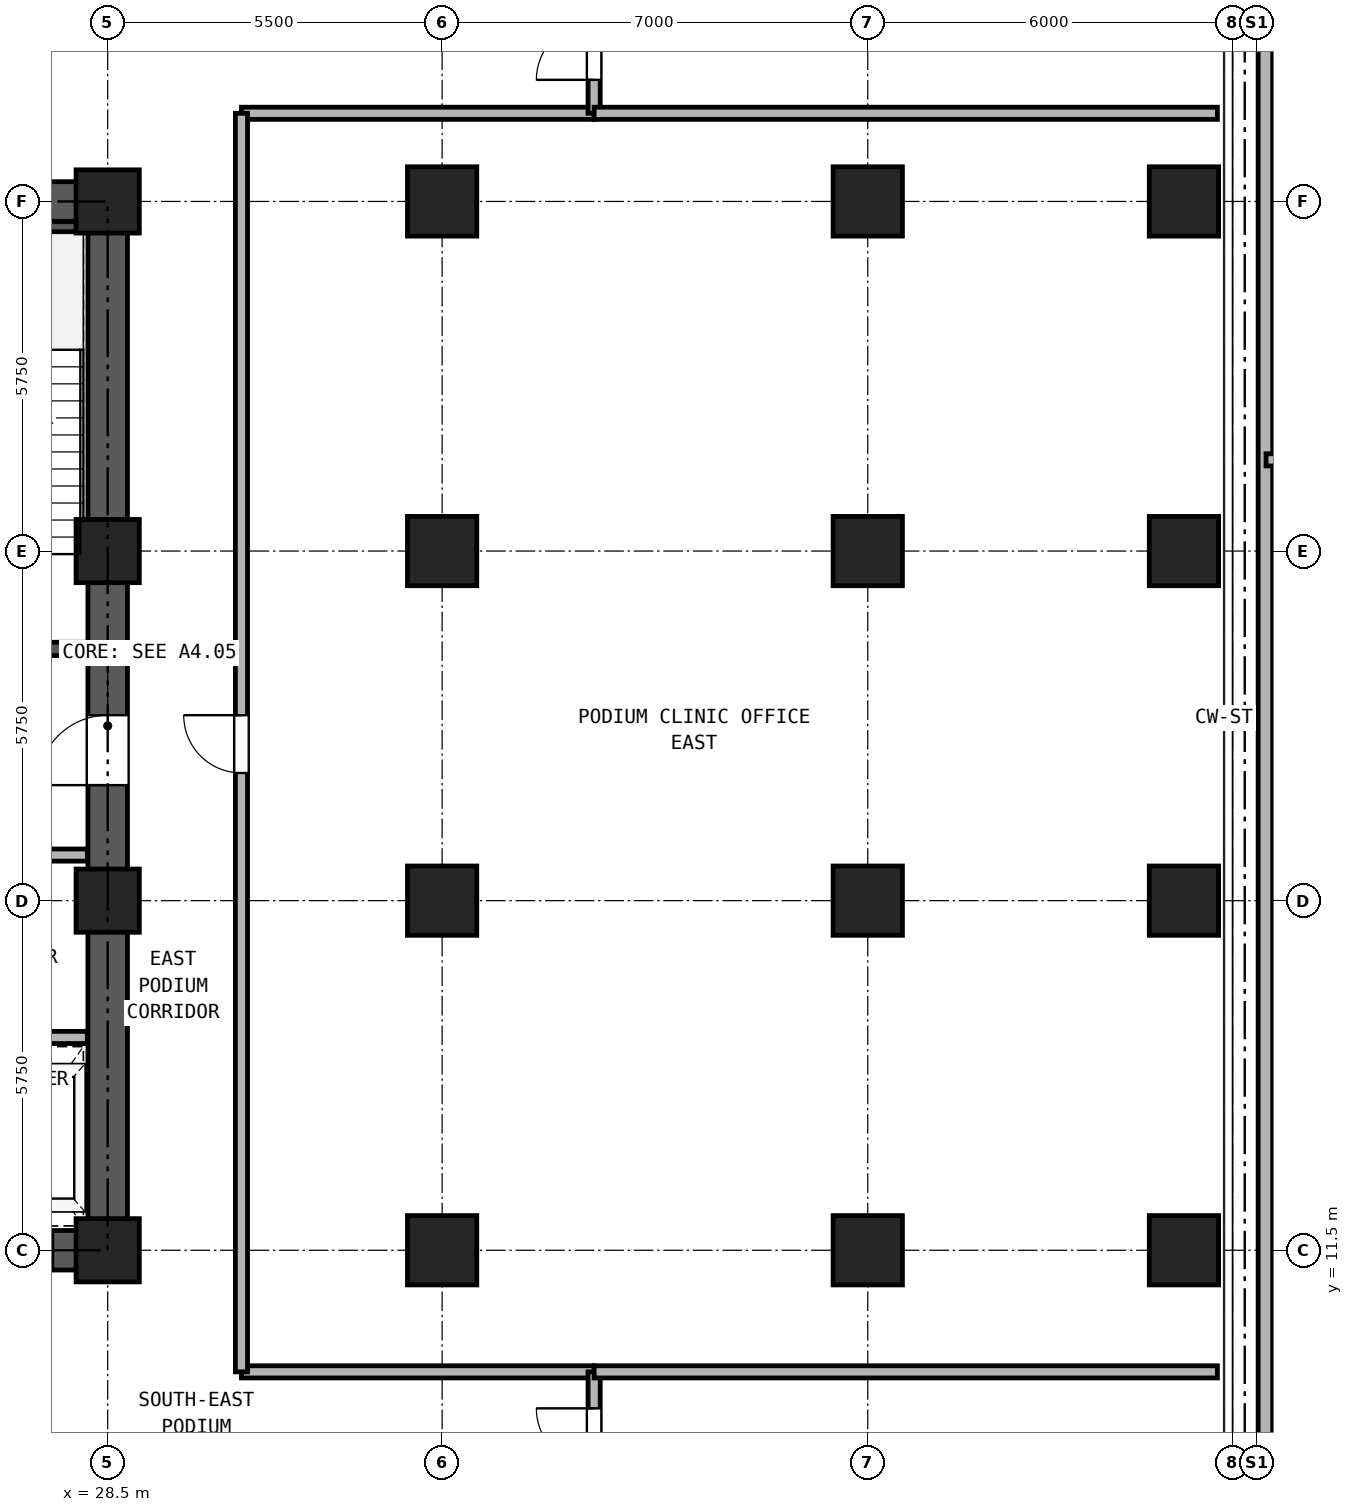
"""IFC4 building model, lengths in metres.
Left out: names, types, materials, properties, quantities, classifications, styles, units other than length and angle.
Written with IfcOpenShell. Run it as: python <this file> out.ifc"""

import sys

from ifc_helpers import new_model, si_unit, direction, frame, frame_2d, origin, origin_2d, place, context, subcontext, project, spatial, rectangle, hollow_rectangle, extrude, source, transform, mapped, element, fill, save


model = new_model("IFC4")
c1 = context("Model", 3, precision=1e-05, world=origin(), true_north=direction((0.0, 1.0)))
c2 = subcontext(c1, "Body", "Model", "MODEL_VIEW")
j1 = project(units=[si_unit("LENGTHUNIT", "METRE"), si_unit("PLANEANGLEUNIT", "RADIAN")], contexts=[c1])
p1 = place(None, origin())
s1 = spatial("IfcSite", under=j1, at=p1, CompositionType="ELEMENT")
p2 = place(p1, origin())
s2 = spatial("IfcBuilding", under=s1, at=p2, CompositionType="ELEMENT")
p3 = place(p2, frame((0.0, 0.0, 13.5)))
s3 = spatial("IfcBuildingStorey", under=s2, at=p3, CompositionType="ELEMENT", Elevation=13.5)
m1 = source(origin(), c2, "Body", "SweptSolid", [
    extrude(hollow_rectangle(XDim=1.14, YDim=1.14, WallThickness=0.07, at=origin_2d()), origin(), (0.0, 0.0, 1.0), 4.18),
])
for number, where, z_axis, x_axis in (
    (1, (46.2, 11.5, 0.0), (0.0, 0.0, 1.0), (1.0, 0.0, 0.0)),
    (2, (46.2, 17.25, 0.0), (0.0, 0.0, 1.0), (1.0, 0.0, 0.0)),
    (3, (46.2, 23.0, 0.0), (0.0, 0.0, 1.0), (1.0, 0.0, 0.0)),
    (4, (46.2, 28.75, 0.0), (0.0, 0.0, 1.0), (1.0, 0.0, 0.0)),
):
    element("IfcColumn", number, at=place(p3, frame(where, z_axis=z_axis, x_axis=x_axis)), inside=s3, PredefinedType="COLUMN", context=c2, shape_type="MappedRepresentation", body=[
        mapped(m1, transform((0.0, 0.0, 0.0), x_axis=(1.0, 0.0, 0.0), y_axis=(0.0, 1.0, 0.0), z_axis=(0.0, 0.0, 1.0), scale=1.0)),
    ])
m2 = source(origin(), c2, "Body", "SweptSolid", [
    extrude(hollow_rectangle(XDim=1.04, YDim=1.04, WallThickness=0.065, at=origin_2d()), origin(), (0.0, 0.0, 1.0), 4.18),
])
for number, where, z_axis, x_axis in (
    (5, (28.5, 11.5, 0.0), (0.0, 0.0, 1.0), (1.0, 0.0, 0.0)),
    (6, (28.5, 17.25, 0.0), (0.0, 0.0, 1.0), (1.0, 0.0, 0.0)),
    (7, (28.5, 23.0, 0.0), (0.0, 0.0, 1.0), (1.0, 0.0, 0.0)),
    (8, (28.5, 28.75, 0.0), (0.0, 0.0, 1.0), (1.0, 0.0, 0.0)),
):
    element("IfcColumn", number, at=place(p3, frame(where, z_axis=z_axis, x_axis=x_axis)), inside=s3, PredefinedType="COLUMN", context=c2, shape_type="MappedRepresentation", body=[
        mapped(m2, transform((0.0, 0.0, 0.0), x_axis=(1.0, 0.0, 0.0), y_axis=(0.0, 1.0, 0.0), z_axis=(0.0, 0.0, 1.0), scale=1.0)),
    ])
for number, where, z_axis, x_axis in (
    (9, (34.0, 11.5, 0.0), (0.0, 0.0, 1.0), (1.0, 0.0, 0.0)),
    (10, (34.0, 17.25, 0.0), (0.0, 0.0, 1.0), (1.0, 0.0, 0.0)),
    (11, (34.0, 23.0, 0.0), (0.0, 0.0, 1.0), (1.0, 0.0, 0.0)),
    (12, (34.0, 28.75, 0.0), (0.0, 0.0, 1.0), (1.0, 0.0, 0.0)),
    (13, (41.0, 11.5, 0.0), (0.0, 0.0, 1.0), (1.0, 0.0, 0.0)),
    (14, (41.0, 17.25, 0.0), (0.0, 0.0, 1.0), (1.0, 0.0, 0.0)),
    (15, (41.0, 23.0, 0.0), (0.0, 0.0, 1.0), (1.0, 0.0, 0.0)),
    (16, (41.0, 28.75, 0.0), (0.0, 0.0, 1.0), (1.0, 0.0, 0.0)),
):
    element("IfcColumn", number, at=place(p3, frame(where, z_axis=z_axis, x_axis=x_axis)), inside=s3, PredefinedType="COLUMN", context=c2, shape_type="MappedRepresentation", body=[
        mapped(m1, transform((0.0, 0.0, 0.0), x_axis=(1.0, 0.0, 0.0), y_axis=(0.0, 1.0, 0.0), z_axis=(0.0, 0.0, 1.0), scale=1.0)),
    ])
p4 = place(p3, frame((47.54, -0.54, 0.0), z_axis=(0.0, 0.0, 1.0), x_axis=(0.0, 1.0, 0.0)))
e17 = element("IfcWall", 17, at=p4, inside=s3, PredefinedType="SOLIDWALL", context=c2, shape_type="SweptSolid", body=[
    extrude(rectangle(XDim=40.89, YDim=0.24, at=frame_2d((20.445, 0.0))), origin(), (0.0, 0.0, 1.0), 4.18),
])
p5 = place(p3, frame((18.175, 11.5, 0.0), z_axis=(0.0, 0.0, 1.0), x_axis=(1.0, 0.0, 0.0)))
e18 = element("IfcWall", 18, at=p5, inside=s3, PredefinedType="SHEAR", context=c2, shape_type="SweptSolid", body=[
    extrude(rectangle(XDim=10.65, YDim=0.65, at=frame_2d((5.325, 0.0))), origin(), (0.0, 0.0, 1.0), 4.18),
])
p6 = place(p5, frame((1.195, 0.0, 0.0)))
e19 = element("IfcOpeningElement", 19, at=p6, cuts=e18, PredefinedType="OPENING", context=c2, shape_type="SweptSolid", body=[
    extrude(rectangle(XDim=1.1, YDim=2.25, at=frame_2d((0.55, 1.125))), frame((0.0, 0.335, 0.0), z_axis=(0.0, -1.0, 0.0), x_axis=(1.0, 0.0, 0.0)), (0.0, 0.0, 1.0), 0.67),
])
p7 = place(p5, frame((3.495, 0.0, 0.0)))
e20 = element("IfcOpeningElement", 20, at=p7, cuts=e18, PredefinedType="OPENING", context=c2, shape_type="SweptSolid", body=[
    extrude(rectangle(XDim=1.1, YDim=2.25, at=frame_2d((0.55, 1.125))), frame((0.0, 0.335, 0.0), z_axis=(0.0, -1.0, 0.0), x_axis=(1.0, 0.0, 0.0)), (0.0, 0.0, 1.0), 0.67),
])
p8 = place(p5, frame((5.925, 0.0, 0.0)))
e21 = element("IfcOpeningElement", 21, at=p8, cuts=e18, PredefinedType="OPENING", context=c2, shape_type="SweptSolid", body=[
    extrude(rectangle(XDim=1.1, YDim=2.25, at=frame_2d((0.55, 1.125))), frame((0.0, 0.335, 0.0), z_axis=(0.0, -1.0, 0.0), x_axis=(1.0, 0.0, 0.0)), (0.0, 0.0, 1.0), 0.67),
])
p9 = place(p5, frame((8.325, 0.0, 0.0)))
e22 = element("IfcOpeningElement", 22, at=p9, cuts=e18, PredefinedType="OPENING", context=c2, shape_type="SweptSolid", body=[
    extrude(rectangle(XDim=1.1, YDim=2.25, at=frame_2d((0.55, 1.125))), frame((0.0, 0.335, 0.0), z_axis=(0.0, -1.0, 0.0), x_axis=(1.0, 0.0, 0.0)), (0.0, 0.0, 1.0), 0.67),
])
p10 = place(p3, frame((18.175, 28.75, 0.0), z_axis=(0.0, 0.0, 1.0), x_axis=(1.0, 0.0, 0.0)))
e23 = element("IfcWall", 23, at=p10, inside=s3, PredefinedType="SHEAR", context=c2, shape_type="SweptSolid", body=[
    extrude(rectangle(XDim=10.65, YDim=0.65, at=frame_2d((5.325, 0.0))), origin(), (0.0, 0.0, 1.0), 4.18),
])
p11 = place(p10, frame((4.205, 0.0, 0.0)))
e24 = element("IfcOpeningElement", 24, at=p11, cuts=e23, PredefinedType="OPENING", context=c2, shape_type="SweptSolid", body=[
    extrude(rectangle(XDim=0.9, YDim=2.05, at=frame_2d((0.45, 1.025))), frame((0.0, 0.335, 0.0), z_axis=(0.0, -1.0, 0.0), x_axis=(1.0, 0.0, 0.0)), (0.0, 0.0, 1.0), 0.67),
])
p12 = place(p10, frame((5.745, 0.0, 0.0)))
e25 = element("IfcOpeningElement", 25, at=p12, cuts=e23, PredefinedType="OPENING", context=c2, shape_type="SweptSolid", body=[
    extrude(rectangle(XDim=0.9, YDim=2.05, at=frame_2d((0.45, 1.025))), frame((0.0, 0.335, 0.0), z_axis=(0.0, -1.0, 0.0), x_axis=(1.0, 0.0, 0.0)), (0.0, 0.0, 1.0), 0.67),
])
p13 = place(p3, frame((28.5, 11.825, 0.0), z_axis=(0.0, 0.0, 1.0), x_axis=(0.0, 1.0, 0.0)))
e26 = element("IfcWall", 26, at=p13, inside=s3, PredefinedType="SHEAR", context=c2, shape_type="SweptSolid", body=[
    extrude(rectangle(XDim=16.6, YDim=0.65, at=frame_2d((8.3, 0.0))), origin(), (0.0, 0.0, 1.0), 4.18),
])
p14 = place(p13, frame((7.325, 0.0, 0.0)))
e27 = element("IfcOpeningElement", 27, at=p14, cuts=e26, PredefinedType="OPENING", context=c2, shape_type="SweptSolid", body=[
    extrude(rectangle(XDim=1.15, YDim=2.2, at=frame_2d((0.575, 1.1))), frame((0.0, 0.335, 0.0), z_axis=(0.0, -1.0, 0.0), x_axis=(1.0, 0.0, 0.0)), (0.0, 0.0, 1.0), 0.67),
])
p15 = place(p3, frame((25.13, 28.335, 0.0), z_axis=(0.0, 0.0, 1.0), x_axis=(1.0, 0.0, 0.0)))
e28 = element("IfcWall", 28, at=p15, inside=s3, PredefinedType="PARTITIONING", context=c2, shape_type="SweptSolid", body=[
    extrude(rectangle(XDim=3.035, YDim=0.165, at=frame_2d((1.518, 0.0))), origin(), (0.0, 0.0, 1.0), 4.18),
])
p16 = place(p3, frame((25.13, 21.39, 0.0), z_axis=(0.0, 0.0, 1.0), x_axis=(1.0, 0.0, 0.0)))
e29 = element("IfcWall", 29, at=p16, inside=s3, PredefinedType="SOLIDWALL", context=c2, shape_type="SweptSolid", body=[
    extrude(rectangle(XDim=3.035, YDim=0.22, at=frame_2d((1.518, 0.0))), origin(), (0.0, 0.0, 1.0), 4.18),
])
p17 = place(p16, frame((0.92, 0.0, 0.0)))
e30 = element("IfcOpeningElement", 30, at=p17, cuts=e29, PredefinedType="OPENING", context=c2, shape_type="SweptSolid", body=[
    extrude(rectangle(XDim=1.15, YDim=2.2, at=frame_2d((0.575, 1.1))), frame((0.0, 0.12, 0.0), z_axis=(0.0, -1.0, 0.0), x_axis=(1.0, 0.0, 0.0)), (0.0, 0.0, 1.0), 0.24),
])
p18 = place(p3, frame((18.835, 18.0, 0.0), z_axis=(0.0, 0.0, 1.0), x_axis=(1.0, 0.0, 0.0)))
e31 = element("IfcWall", 31, at=p18, inside=s3, PredefinedType="PARTITIONING", context=c2, shape_type="SweptSolid", body=[
    extrude(rectangle(XDim=9.33, YDim=0.2, at=frame_2d((4.665, 0.0))), origin(), (0.0, 0.0, 1.0), 4.18),
])
p19 = place(p18, frame((0.415, 0.0, 0.0)))
e32 = element("IfcOpeningElement", 32, at=p19, cuts=e31, PredefinedType="OPENING", context=c2, shape_type="SweptSolid", body=[
    extrude(rectangle(XDim=1.3, YDim=2.3, at=frame_2d((0.65, 1.15))), frame((0.0, 0.11, 0.0), z_axis=(0.0, -1.0, 0.0), x_axis=(1.0, 0.0, 0.0)), (0.0, 0.0, 1.0), 0.22),
])
p20 = place(p18, frame((2.515, 0.0, 0.0)))
e33 = element("IfcOpeningElement", 33, at=p20, cuts=e31, PredefinedType="OPENING", context=c2, shape_type="SweptSolid", body=[
    extrude(rectangle(XDim=1.3, YDim=2.3, at=frame_2d((0.65, 1.15))), frame((0.0, 0.11, 0.0), z_axis=(0.0, -1.0, 0.0), x_axis=(1.0, 0.0, 0.0)), (0.0, 0.0, 1.0), 0.22),
])
p21 = place(p18, frame((4.915, 0.0, 0.0)))
e34 = element("IfcOpeningElement", 34, at=p21, cuts=e31, PredefinedType="OPENING", context=c2, shape_type="SweptSolid", body=[
    extrude(rectangle(XDim=0.9, YDim=2.05, at=frame_2d((0.45, 1.025))), frame((0.0, 0.11, 0.0), z_axis=(0.0, -1.0, 0.0), x_axis=(1.0, 0.0, 0.0)), (0.0, 0.0, 1.0), 0.22),
])
p22 = place(p18, frame((7.615, 0.0, 0.0)))
e35 = element("IfcOpeningElement", 35, at=p22, cuts=e31, PredefinedType="OPENING", context=c2, shape_type="SweptSolid", body=[
    extrude(rectangle(XDim=0.9, YDim=2.05, at=frame_2d((0.45, 1.025))), frame((0.0, 0.11, 0.0), z_axis=(0.0, -1.0, 0.0), x_axis=(1.0, 0.0, 0.0)), (0.0, 0.0, 1.0), 0.22),
])
p23 = place(p3, frame((18.835, 15.0, 0.0), z_axis=(0.0, 0.0, 1.0), x_axis=(1.0, 0.0, 0.0)))
e36 = element("IfcWall", 36, at=p23, inside=s3, PredefinedType="PARTITIONING", context=c2, shape_type="SweptSolid", body=[
    extrude(rectangle(XDim=9.33, YDim=0.2, at=frame_2d((4.665, 0.0))), origin(), (0.0, 0.0, 1.0), 4.18),
])
for number, where, z_axis, x_axis in (
    (37, (30.7, 9.5, 0.0), (0.0, 0.0, 1.0), (1.0, 0.0, 0.0)),
    (38, (30.7, 30.2, 0.0), (0.0, 0.0, 1.0), (1.0, 0.0, 0.0)),
):
    element("IfcWall", number, at=place(p3, frame(where, z_axis=z_axis, x_axis=x_axis)), inside=s3, PredefinedType="PARTITIONING", context=c2, shape_type="SweptSolid", body=[
        extrude(rectangle(XDim=5.8, YDim=0.2, at=frame_2d((2.9, 0.0))), origin(), (0.0, 0.0, 1.0), 4.18),
    ])
p24 = place(p3, frame((30.7, 9.5, 0.0), z_axis=(0.0, 0.0, 1.0), x_axis=(0.0, 1.0, 0.0)))
e39 = element("IfcWall", 39, at=p24, inside=s3, PredefinedType="PARTITIONING", context=c2, shape_type="SweptSolid", body=[
    extrude(rectangle(XDim=20.7, YDim=0.2, at=frame_2d((10.35, 0.0))), origin(), (0.0, 0.0, 1.0), 4.18),
])
p25 = place(p24, frame((9.85, 0.0, 0.0)))
e40 = element("IfcOpeningElement", 40, at=p25, cuts=e39, PredefinedType="OPENING", context=c2, shape_type="SweptSolid", body=[
    extrude(rectangle(XDim=0.95, YDim=2.15, at=frame_2d((0.475, 1.075))), frame((0.0, 0.11, 0.0), z_axis=(0.0, -1.0, 0.0), x_axis=(1.0, 0.0, 0.0)), (0.0, 0.0, 1.0), 0.22),
])
p26 = place(p3, frame((36.5, 0.25, 0.0), z_axis=(0.0, 0.0, 1.0), x_axis=(0.0, 1.0, 0.0)))
e41 = element("IfcWall", 41, at=p26, inside=s3, PredefinedType="PARTITIONING", context=c2, shape_type="SweptSolid", body=[
    extrude(rectangle(XDim=9.25, YDim=0.2, at=frame_2d((4.625, 0.0))), origin(), (0.0, 0.0, 1.0), 4.18),
])
p27 = place(p26, frame((7.7, 0.0, 0.0)))
e42 = element("IfcOpeningElement", 42, at=p27, cuts=e41, PredefinedType="OPENING", context=c2, shape_type="SweptSolid", body=[
    extrude(rectangle(XDim=0.95, YDim=2.15, at=frame_2d((0.475, 1.075))), frame((0.0, 0.11, 0.0), z_axis=(0.0, -1.0, 0.0), x_axis=(1.0, 0.0, 0.0)), (0.0, 0.0, 1.0), 0.22),
])
p28 = place(p3, frame((36.5, 30.2, 0.0), z_axis=(0.0, 0.0, 1.0), x_axis=(0.0, 1.0, 0.0)))
e43 = element("IfcWall", 43, at=p28, inside=s3, PredefinedType="PARTITIONING", context=c2, shape_type="SweptSolid", body=[
    extrude(rectangle(XDim=10.05, YDim=0.2, at=frame_2d((5.025, 0.0))), origin(), (0.0, 0.0, 1.0), 4.18),
])
p29 = place(p28, frame((0.55, 0.0, 0.0)))
e44 = element("IfcOpeningElement", 44, at=p29, cuts=e43, PredefinedType="OPENING", context=c2, shape_type="SweptSolid", body=[
    extrude(rectangle(XDim=0.95, YDim=2.15, at=frame_2d((0.475, 1.075))), frame((0.0, 0.11, 0.0), z_axis=(0.0, -1.0, 0.0), x_axis=(1.0, 0.0, 0.0)), (0.0, 0.0, 1.0), 0.22),
])
for number, where, z_axis, x_axis in (
    (45, (36.5, 9.5, 0.0), (0.0, 0.0, 1.0), (1.0, 0.0, 0.0)),
    (46, (36.5, 30.2, 0.0), (0.0, 0.0, 1.0), (1.0, 0.0, 0.0)),
):
    element("IfcWall", number, at=place(p3, frame(where, z_axis=z_axis, x_axis=x_axis)), inside=s3, PredefinedType="PARTITIONING", context=c2, shape_type="SweptSolid", body=[
        extrude(rectangle(XDim=10.25, YDim=0.2, at=frame_2d((5.125, 0.0))), origin(), (0.0, 0.0, 1.0), 4.18),
    ])
p30 = place(p3, frame((47.55, 24.5, 0.0), z_axis=(0.0, 0.0, 1.0), x_axis=(1.0, 0.0, 0.0)))
e47 = element("IfcWall", 47, at=p30, inside=s3, PredefinedType="PARTITIONING", context=c2, shape_type="SweptSolid", body=[
    extrude(rectangle(XDim=23.9, YDim=0.2, at=frame_2d((11.95, 0.0))), origin(), (0.0, 0.0, 1.0), 4.18),
])
p31 = place(p30, frame((3.45, 0.0, 0.0)))
e48 = element("IfcOpeningElement", 48, at=p31, cuts=e47, PredefinedType="OPENING", context=c2, shape_type="SweptSolid", body=[
    extrude(rectangle(XDim=1.3, YDim=2.2, at=frame_2d((0.65, 1.1))), frame((0.0, 0.11, 0.0), z_axis=(0.0, -1.0, 0.0), x_axis=(1.0, 0.0, 0.0)), (0.0, 0.0, 1.0), 0.22),
])
p32 = place(p14, origin())
e49 = element("IfcDoor", 49, at=p32, inside=s3, OperationType="SINGLE_SWING_LEFT", PredefinedType="DOOR", context=c2, shape_type="SweptSolid", body=[
    extrude(rectangle(XDim=1.15, YDim=2.2, at=frame_2d((0.575, 1.1))), frame((0.0, 0.025, 0.0), z_axis=(0.0, -1.0, 0.0), x_axis=(1.0, 0.0, 0.0)), (0.0, 0.0, 1.0), 0.05),
])
fill(e27, e49)
p33 = place(p9, frame((1.1, 0.0, 0.0), z_axis=(0.0, 0.0, 1.0), x_axis=(-1.0, 0.0, 0.0)))
e50 = element("IfcDoor", 50, at=p33, inside=s3, OperationType="DOUBLE_DOOR_SLIDING", PredefinedType="DOOR", context=c2, shape_type="SweptSolid", body=[
    extrude(rectangle(XDim=1.1, YDim=2.25, at=frame_2d((0.55, 1.125))), frame((0.0, 0.025, 0.0), z_axis=(0.0, -1.0, 0.0), x_axis=(1.0, 0.0, 0.0)), (0.0, 0.0, 1.0), 0.05),
])
fill(e22, e50)
p34 = place(p27, origin())
e51 = element("IfcDoor", 51, at=p34, inside=s3, OperationType="SINGLE_SWING_RIGHT", PredefinedType="DOOR", context=c2, shape_type="SweptSolid", body=[
    extrude(rectangle(XDim=0.95, YDim=2.15, at=frame_2d((0.475, 1.075))), frame((0.0, 0.025, 0.0), z_axis=(0.0, -1.0, 0.0), x_axis=(1.0, 0.0, 0.0)), (0.0, 0.0, 1.0), 0.05),
])
fill(e42, e51)
p35 = place(p29, origin())
e52 = element("IfcDoor", 52, at=p35, inside=s3, OperationType="SINGLE_SWING_LEFT", PredefinedType="DOOR", context=c2, shape_type="SweptSolid", body=[
    extrude(rectangle(XDim=0.95, YDim=2.15, at=frame_2d((0.475, 1.075))), frame((0.0, 0.025, 0.0), z_axis=(0.0, -1.0, 0.0), x_axis=(1.0, 0.0, 0.0)), (0.0, 0.0, 1.0), 0.05),
])
fill(e44, e52)
p36 = place(p25, origin())
e53 = element("IfcDoor", 53, at=p36, inside=s3, OperationType="SINGLE_SWING_RIGHT", PredefinedType="DOOR", context=c2, shape_type="SweptSolid", body=[
    extrude(rectangle(XDim=0.95, YDim=2.15, at=frame_2d((0.475, 1.075))), frame((0.0, 0.025, 0.0), z_axis=(0.0, -1.0, 0.0), x_axis=(1.0, 0.0, 0.0)), (0.0, 0.0, 1.0), 0.05),
])
fill(e40, e53)
save(model, sys.argv[1])
